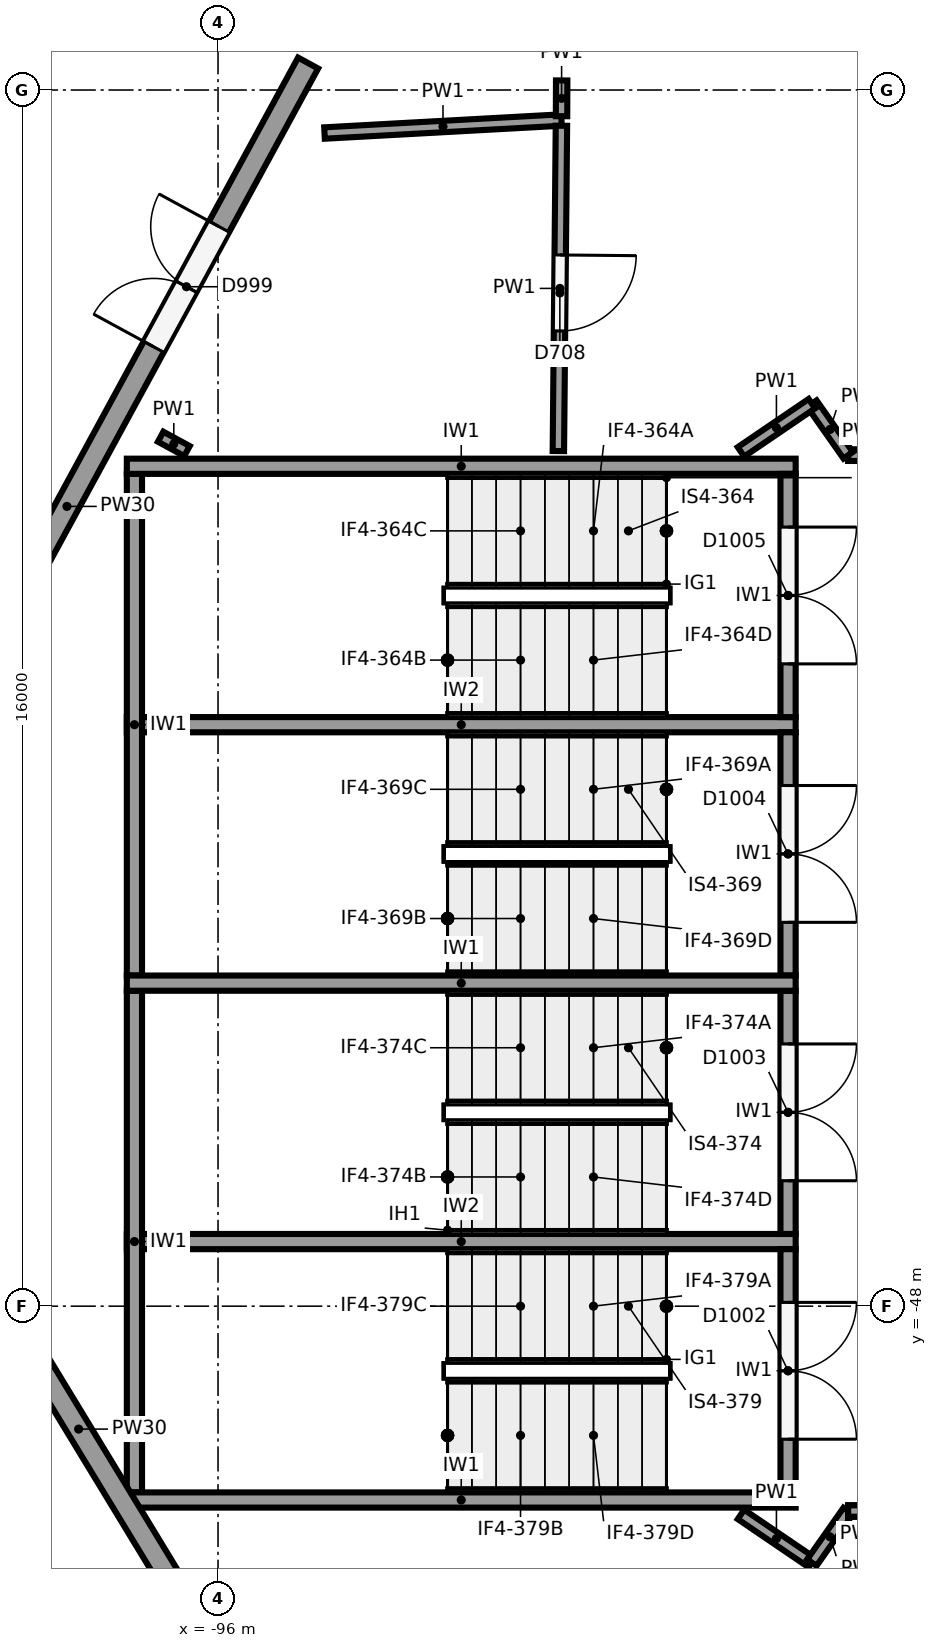
"""IFC4 building model, lengths in metres.
Left out: names, types, materials, properties, quantities, classifications, styles, units other than length and angle.
Written with IfcOpenShell. Run it as: python <this file> out.ifc"""

import sys

from ifc_helpers import new_model, si_unit, direction, frame, frame_2d, origin, origin_2d, place, context, subcontext, project, spatial, rectangle, circle, extrude, element, fill, save


model = new_model("IFC4")
c1 = context("Model", 3, precision=1e-05, world=origin(), true_north=direction((0.0, 1.0)))
c2 = subcontext(c1, "Body", "Model", "MODEL_VIEW")
j1 = project(units=[si_unit("LENGTHUNIT", "METRE"), si_unit("PLANEANGLEUNIT", "RADIAN")], contexts=[c1])
p1 = place(None, origin())
s1 = spatial("IfcSite", under=j1, at=p1, CompositionType="ELEMENT")
p2 = place(p1, origin())
s2 = spatial("IfcBuilding", under=s1, at=p2, CompositionType="ELEMENT")
p3 = place(p2, frame((0.0, 0.0, 12.0)))
s3 = spatial("IfcBuildingStorey", under=s2, at=p3, CompositionType="ELEMENT", Elevation=12.0)
p4 = place(p3, frame((-94.6, -31.25, 0.0), z_axis=(0.0, 0.0, 1.0), x_axis=(1.0, 0.0, 0.0)))
e1 = element("IfcColumn", 1, at=p4, inside=s3, PredefinedType="COLUMN", context=c2, shape_type="SweptSolid", body=[
    extrude(circle(Radius=0.45, at=origin_2d()), origin(), (0.0, 0.0, 1.0), 6.0),
])
p5 = place(p3, frame((-101.161, -43.311, 0.0), z_axis=(0.0, 0.0, 1.0), x_axis=(0.477867771117, 0.878431780691, 0.0)))
e2 = element("IfcWall", 2, at=p5, inside=s3, PredefinedType="SOLIDWALL", context=c2, shape_type="SweptSolid", body=[
    extrude(rectangle(XDim=13.28, YDim=0.3, at=frame_2d((6.64, 0.0))), origin(), (0.0, 0.0, 1.0), 4.35),
])
p6 = place(p5, frame((9.03, 0.0, 0.0)))
e3 = element("IfcOpeningElement", 3, at=p6, cuts=e2, PredefinedType="OPENING", context=c2, shape_type="SweptSolid", body=[
    extrude(rectangle(XDim=1.8, YDim=2.4, at=frame_2d((0.9, 1.2))), frame((0.0, 0.16, 0.0), z_axis=(0.0, -1.0, 0.0), x_axis=(1.0, 0.0, 0.0)), (0.0, 0.0, 1.0), 0.32),
])
p7 = place(p3, frame((-94.528, -55.057, 0.0), z_axis=(0.0, 0.0, 1.0), x_axis=(-0.519362860044, 0.854553813172, 0.0)))
e4 = element("IfcWall", 4, at=p7, inside=s3, PredefinedType="SOLIDWALL", context=c2, shape_type="SweptSolid", body=[
    extrude(rectangle(XDim=12.732, YDim=0.3, at=frame_2d((6.366, 0.0))), origin(), (0.0, 0.0, 1.0), 4.35),
])
for number, where, z_axis, x_axis in (
    (5, (-97.2, -36.95, 0.0), (0.0, 0.0, 1.0), (1.0, 0.0, 0.0)),
    (6, (-97.2, -43.75, 0.0), (0.0, 0.0, 1.0), (1.0, 0.0, 0.0)),
    (7, (-97.2, -50.55, 0.0), (0.0, 0.0, 1.0), (1.0, 0.0, 0.0)),
):
    element("IfcWall", number, at=place(p3, frame(where, z_axis=z_axis, x_axis=x_axis)), inside=s3, PredefinedType="SHEAR", context=c2, shape_type="SweptSolid", body=[
        extrude(rectangle(XDim=8.8, YDim=0.2, at=frame_2d((4.4, 0.0))), origin(), (0.0, 0.0, 1.0), 5.65),
    ])
for number, where, z_axis, x_axis in (
    (8, (-97.1, -37.05, 0.0), (0.0, 0.0, 1.0), (0.0, -1.0, 0.0)),
    (9, (-97.1, -43.85, 0.0), (0.0, 0.0, 1.0), (0.0, -1.0, 0.0)),
):
    element("IfcWall", number, at=place(p3, frame(where, z_axis=z_axis, x_axis=x_axis)), inside=s3, PredefinedType="SHEAR", context=c2, shape_type="SweptSolid", body=[
        extrude(rectangle(XDim=6.6, YDim=0.2, at=frame_2d((3.3, 0.0))), origin(), (0.0, 0.0, 1.0), 5.65),
    ])
for number, where, z_axis, x_axis in (
    (10, (-97.2, -40.35, 0.0), (0.0, 0.0, 1.0), (1.0, 0.0, 0.0)),
    (11, (-97.2, -47.15, 0.0), (0.0, 0.0, 1.0), (1.0, 0.0, 0.0)),
):
    element("IfcWall", number, at=place(p3, frame(where, z_axis=z_axis, x_axis=x_axis)), inside=s3, PredefinedType="SHEAR", context=c2, shape_type="SweptSolid", body=[
        extrude(rectangle(XDim=8.8, YDim=0.2, at=frame_2d((4.4, 0.0))), origin(), (0.0, 0.0, 1.0), 5.65),
    ])
p8 = place(p3, frame((-88.5, -37.05, 0.0), z_axis=(0.0, 0.0, 1.0), x_axis=(0.0, -1.0, 0.0)))
e12 = element("IfcWall", 12, at=p8, inside=s3, PredefinedType="SHEAR", context=c2, shape_type="SweptSolid", body=[
    extrude(rectangle(XDim=3.2, YDim=0.2, at=frame_2d((1.6, 0.0))), origin(), (0.0, 0.0, 1.0), 5.65),
])
p9 = place(p8, frame((0.7, 0.0, 0.0)))
e13 = element("IfcOpeningElement", 13, at=p9, cuts=e12, PredefinedType="OPENING", context=c2, shape_type="SweptSolid", body=[
    extrude(rectangle(XDim=1.8, YDim=2.1, at=frame_2d((0.9, 1.05))), frame((0.0, 0.11, 0.0), z_axis=(0.0, -1.0, 0.0), x_axis=(1.0, 0.0, 0.0)), (0.0, 0.0, 1.0), 0.22),
])
p10 = place(p3, frame((-88.5, -40.45, 0.0), z_axis=(0.0, 0.0, 1.0), x_axis=(0.0, -1.0, 0.0)))
e14 = element("IfcWall", 14, at=p10, inside=s3, PredefinedType="SHEAR", context=c2, shape_type="SweptSolid", body=[
    extrude(rectangle(XDim=3.2, YDim=0.2, at=frame_2d((1.6, 0.0))), origin(), (0.0, 0.0, 1.0), 5.65),
])
p11 = place(p10, frame((0.7, 0.0, 0.0)))
e15 = element("IfcOpeningElement", 15, at=p11, cuts=e14, PredefinedType="OPENING", context=c2, shape_type="SweptSolid", body=[
    extrude(rectangle(XDim=1.8, YDim=2.1, at=frame_2d((0.9, 1.05))), frame((0.0, 0.11, 0.0), z_axis=(0.0, -1.0, 0.0), x_axis=(1.0, 0.0, 0.0)), (0.0, 0.0, 1.0), 0.22),
])
p12 = place(p3, frame((-88.5, -43.85, 0.0), z_axis=(0.0, 0.0, 1.0), x_axis=(0.0, -1.0, 0.0)))
e16 = element("IfcWall", 16, at=p12, inside=s3, PredefinedType="SHEAR", context=c2, shape_type="SweptSolid", body=[
    extrude(rectangle(XDim=3.2, YDim=0.2, at=frame_2d((1.6, 0.0))), origin(), (0.0, 0.0, 1.0), 5.65),
])
p13 = place(p12, frame((0.7, 0.0, 0.0)))
e17 = element("IfcOpeningElement", 17, at=p13, cuts=e16, PredefinedType="OPENING", context=c2, shape_type="SweptSolid", body=[
    extrude(rectangle(XDim=1.8, YDim=2.1, at=frame_2d((0.9, 1.05))), frame((0.0, 0.11, 0.0), z_axis=(0.0, -1.0, 0.0), x_axis=(1.0, 0.0, 0.0)), (0.0, 0.0, 1.0), 0.22),
])
p14 = place(p3, frame((-88.5, -47.25, 0.0), z_axis=(0.0, 0.0, 1.0), x_axis=(0.0, -1.0, 0.0)))
e18 = element("IfcWall", 18, at=p14, inside=s3, PredefinedType="SHEAR", context=c2, shape_type="SweptSolid", body=[
    extrude(rectangle(XDim=3.2, YDim=0.2, at=frame_2d((1.6, 0.0))), origin(), (0.0, 0.0, 1.0), 5.65),
])
p15 = place(p14, frame((0.7, 0.0, 0.0)))
e19 = element("IfcOpeningElement", 19, at=p15, cuts=e18, PredefinedType="OPENING", context=c2, shape_type="SweptSolid", body=[
    extrude(rectangle(XDim=1.8, YDim=2.1, at=frame_2d((0.9, 1.05))), frame((0.0, 0.11, 0.0), z_axis=(0.0, -1.0, 0.0), x_axis=(1.0, 0.0, 0.0)), (0.0, 0.0, 1.0), 0.22),
])
p16 = place(p3, frame((-96.408, -36.75, 0.0), z_axis=(0.0, 0.0, 1.0), x_axis=(-0.878438378965, 0.477855641759, 0.0)))
e20 = element("IfcWall", 20, at=p16, inside=s3, PredefinedType="PARTITIONING", context=c2, shape_type="SweptSolid", body=[
    extrude(rectangle(XDim=0.395, YDim=0.15, at=frame_2d((0.198, 0.0))), origin(), (0.0, 0.0, 1.0), 5.65),
])
p17 = place(p3, frame((-94.599, -32.566, 0.0), z_axis=(0.0, 0.0, 1.0), x_axis=(0.998501215995, 0.054729531845, 0.0)))
e21 = element("IfcWall", 21, at=p17, inside=s3, PredefinedType="PARTITIONING", context=c2, shape_type="SweptSolid", body=[
    extrude(rectangle(XDim=3.123, YDim=0.15, at=frame_2d((1.561, 0.0))), origin(), (0.0, 0.0, 1.0), 5.65),
])
p18 = place(p3, frame((-91.482, -32.47, 0.0), z_axis=(0.0, 0.0, 1.0), x_axis=(-0.009411482079, -0.999955711022, 0.0)))
e22 = element("IfcWall", 22, at=p18, inside=s3, PredefinedType="PARTITIONING", context=c2, shape_type="SweptSolid", body=[
    extrude(rectangle(XDim=4.28, YDim=0.15, at=frame_2d((2.14, 0.0))), origin(), (0.0, 0.0, 1.0), 5.65),
])
p19 = place(p18, frame((1.7, 0.0, 0.0)))
e23 = element("IfcOpeningElement", 23, at=p19, cuts=e22, PredefinedType="OPENING", context=c2, shape_type="SweptSolid", body=[
    extrude(rectangle(XDim=1.0, YDim=2.1, at=frame_2d((0.5, 1.05))), frame((0.0, 0.085, 0.0), z_axis=(0.0, -1.0, 0.0), x_axis=(1.0, 0.0, 0.0)), (0.0, 0.0, 1.0), 0.17),
])
p20 = place(p3, frame((-91.479, -31.874, 0.0), z_axis=(0.0, 0.0, 1.0), x_axis=(-0.00362691915, -0.999993422707, 0.0)))
e24 = element("IfcWall", 24, at=p20, inside=s3, PredefinedType="PARTITIONING", context=c2, shape_type="SweptSolid", body=[
    extrude(rectangle(XDim=0.471, YDim=0.15, at=frame_2d((0.236, 0.0))), origin(), (0.0, 0.0, 1.0), 5.65),
])
p21 = place(p3, frame((-89.12, -50.74, 0.0), z_axis=(0.0, 0.0, 1.0), x_axis=(0.827055308354, -0.562120553728, 0.0)))
e25 = element("IfcWall", 25, at=p21, inside=s3, PredefinedType="PARTITIONING", context=c2, shape_type="SweptSolid", body=[
    extrude(rectangle(XDim=1.128, YDim=0.15, at=frame_2d((0.564, 0.0))), origin(), (0.0, 0.0, 1.0), 5.65),
])
p22 = place(p3, frame((-88.187, -51.374, 0.0), z_axis=(0.0, 0.0, 1.0), x_axis=(0.575376756214, 0.817888493872, 0.0)))
e26 = element("IfcWall", 26, at=p22, inside=s3, PredefinedType="PARTITIONING", context=c2, shape_type="SweptSolid", body=[
    extrude(rectangle(XDim=0.83, YDim=0.15, at=frame_2d((0.415, 0.0))), origin(), (0.0, 0.0, 1.0), 5.65),
])
p23 = place(p3, frame((-87.709, -50.695, 0.0), z_axis=(0.0, 0.0, 1.0), x_axis=(1.0, 0.0, 0.0)))
e27 = element("IfcWall", 27, at=p23, inside=s3, PredefinedType="PARTITIONING", context=c2, shape_type="SweptSolid", body=[
    extrude(rectangle(XDim=3.704, YDim=0.15, at=frame_2d((1.852, 0.0))), origin(), (0.0, 0.0, 1.0), 4.55),
])
p24 = place(p23, frame((0.65, 0.0, 0.0)))
e28 = element("IfcOpeningElement", 28, at=p24, cuts=e27, PredefinedType="OPENING", context=c2, shape_type="SweptSolid", body=[
    extrude(rectangle(XDim=1.8, YDim=2.1, at=frame_2d((0.9, 1.05))), frame((0.0, 0.085, 0.0), z_axis=(0.0, -1.0, 0.0), x_axis=(1.0, 0.0, 0.0)), (0.0, 0.0, 1.0), 0.17),
])
p25 = place(p3, frame((-87.709, -50.695, 4.55), z_axis=(0.0, 0.0, 1.0), x_axis=(1.0, 0.0, 0.0)))
e29 = element("IfcWall", 29, at=p25, inside=s3, PredefinedType="PARTITIONING", context=c2, shape_type="SweptSolid", body=[
    extrude(rectangle(XDim=0.6, YDim=0.15, at=frame_2d((0.3, 0.0))), origin(), (0.0, 0.0, 1.0), 1.1),
])
p26 = place(p3, frame((-81.355, -36.805, 0.0), z_axis=(0.0, 0.0, 1.0), x_axis=(-1.0, 0.0, 0.0)))
e30 = element("IfcWall", 30, at=p26, inside=s3, PredefinedType="PARTITIONING", context=c2, shape_type="SweptSolid", body=[
    extrude(rectangle(XDim=6.354, YDim=0.15, at=frame_2d((3.177, 0.0))), origin(), (0.0, 0.0, 1.0), 4.55),
])
p27 = place(p26, frame((3.85, 0.0, 0.0)))
e31 = element("IfcOpeningElement", 31, at=p27, cuts=e30, PredefinedType="OPENING", context=c2, shape_type="SweptSolid", body=[
    extrude(rectangle(XDim=1.8, YDim=2.1, at=frame_2d((0.9, 1.05))), frame((0.0, 0.085, 0.0), z_axis=(0.0, -1.0, 0.0), x_axis=(1.0, 0.0, 0.0)), (0.0, 0.0, 1.0), 0.17),
])
p28 = place(p3, frame((-87.055, -36.805, 4.55), z_axis=(0.0, 0.0, 1.0), x_axis=(-1.0, 0.0, 0.0)))
e32 = element("IfcWall", 32, at=p28, inside=s3, PredefinedType="PARTITIONING", context=c2, shape_type="SweptSolid", body=[
    extrude(rectangle(XDim=0.654, YDim=0.15, at=frame_2d((0.327, 0.0))), origin(), (0.0, 0.0, 1.0), 1.1),
])
p29 = place(p3, frame((-87.709, -36.805, 0.0), z_axis=(0.0, 0.0, 1.0), x_axis=(-0.575573582652, 0.81774999294, 0.0)))
e33 = element("IfcWall", 33, at=p29, inside=s3, PredefinedType="PARTITIONING", context=c2, shape_type="SweptSolid", body=[
    extrude(rectangle(XDim=0.83, YDim=0.15, at=frame_2d((0.415, 0.0))), origin(), (0.0, 0.0, 1.0), 5.65),
])
p30 = place(p3, frame((-88.187, -36.126, 0.0), z_axis=(0.0, 0.0, 1.0), x_axis=(-0.827055308354, -0.562120553728, 0.0)))
e34 = element("IfcWall", 34, at=p30, inside=s3, PredefinedType="PARTITIONING", context=c2, shape_type="SweptSolid", body=[
    extrude(rectangle(XDim=1.128, YDim=0.15, at=frame_2d((0.564, 0.0))), origin(), (0.0, 0.0, 1.0), 5.65),
])
p31 = place(p6, origin())
e35 = element("IfcDoor", 35, at=p31, inside=s3, OperationType="DOUBLE_DOOR_SINGLE_SWING", PredefinedType="DOOR", context=c2, shape_type="SweptSolid", body=[
    extrude(rectangle(XDim=1.8, YDim=2.4, at=frame_2d((0.9, 1.2))), frame((0.0, 0.025, 0.0), z_axis=(0.0, -1.0, 0.0), x_axis=(1.0, 0.0, 0.0)), (0.0, 0.0, 1.0), 0.05),
])
fill(e3, e35)
p32 = place(p9, origin())
e36 = element("IfcDoor", 36, at=p32, inside=s3, OperationType="DOUBLE_DOOR_SINGLE_SWING", PredefinedType="DOOR", context=c2, shape_type="SweptSolid", body=[
    extrude(rectangle(XDim=1.8, YDim=2.1, at=frame_2d((0.9, 1.05))), frame((0.0, 0.025, 0.0), z_axis=(0.0, -1.0, 0.0), x_axis=(1.0, 0.0, 0.0)), (0.0, 0.0, 1.0), 0.05),
])
fill(e13, e36)
p33 = place(p11, origin())
e37 = element("IfcDoor", 37, at=p33, inside=s3, OperationType="DOUBLE_DOOR_SINGLE_SWING", PredefinedType="DOOR", context=c2, shape_type="SweptSolid", body=[
    extrude(rectangle(XDim=1.8, YDim=2.1, at=frame_2d((0.9, 1.05))), frame((0.0, 0.025, 0.0), z_axis=(0.0, -1.0, 0.0), x_axis=(1.0, 0.0, 0.0)), (0.0, 0.0, 1.0), 0.05),
])
fill(e15, e37)
p34 = place(p13, origin())
e38 = element("IfcDoor", 38, at=p34, inside=s3, OperationType="DOUBLE_DOOR_SINGLE_SWING", PredefinedType="DOOR", context=c2, shape_type="SweptSolid", body=[
    extrude(rectangle(XDim=1.8, YDim=2.1, at=frame_2d((0.9, 1.05))), frame((0.0, 0.025, 0.0), z_axis=(0.0, -1.0, 0.0), x_axis=(1.0, 0.0, 0.0)), (0.0, 0.0, 1.0), 0.05),
])
fill(e17, e38)
p35 = place(p15, origin())
e39 = element("IfcDoor", 39, at=p35, inside=s3, OperationType="DOUBLE_DOOR_SINGLE_SWING", PredefinedType="DOOR", context=c2, shape_type="SweptSolid", body=[
    extrude(rectangle(XDim=1.8, YDim=2.1, at=frame_2d((0.9, 1.05))), frame((0.0, 0.025, 0.0), z_axis=(0.0, -1.0, 0.0), x_axis=(1.0, 0.0, 0.0)), (0.0, 0.0, 1.0), 0.05),
])
fill(e19, e39)
p36 = place(p19, origin())
e40 = element("IfcDoor", 40, at=p36, inside=s3, OperationType="SINGLE_SWING_LEFT", PredefinedType="DOOR", context=c2, shape_type="SweptSolid", body=[
    extrude(rectangle(XDim=1.0, YDim=2.1, at=frame_2d((0.5, 1.05))), frame((0.0, 0.025, 0.0), z_axis=(0.0, -1.0, 0.0), x_axis=(1.0, 0.0, 0.0)), (0.0, 0.0, 1.0), 0.05),
])
fill(e23, e40)
save(model, sys.argv[1])
